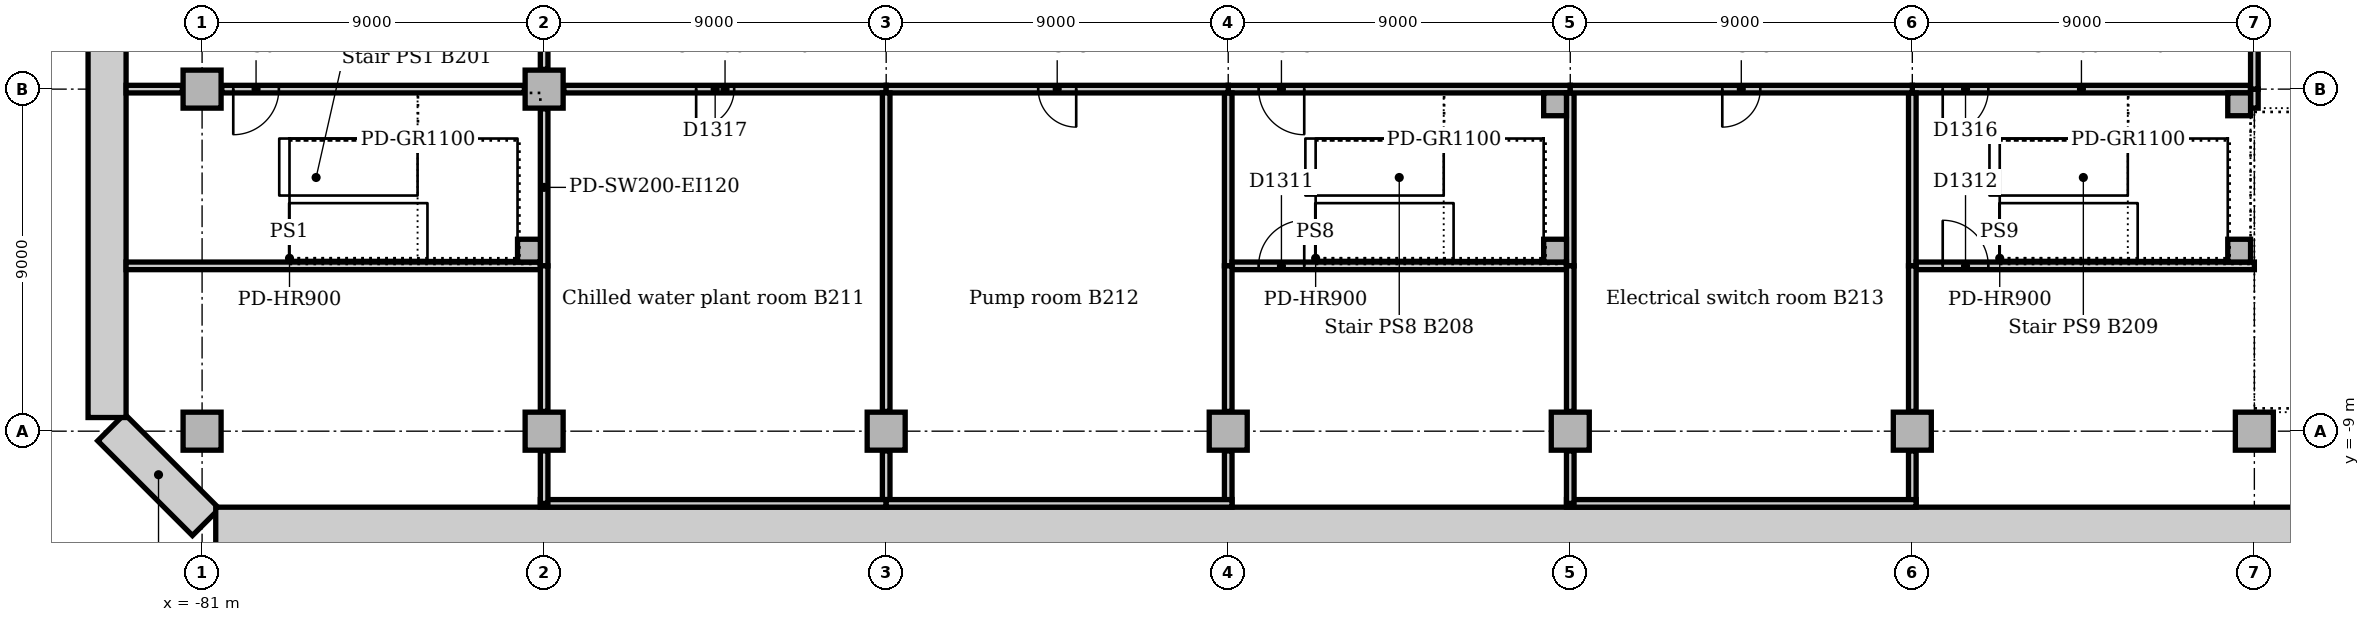
"""IFC4 building model, lengths in metres.
Left out: names, types, materials, properties, quantities, classifications, styles, units other than length and angle.
Written with IfcOpenShell. Run it as: python <this file> out.ifc"""

import sys

from ifc_helpers import new_model, si_unit, direction, frame, frame_2d, origin, origin_2d, place, context, subcontext, project, spatial, rectangle, extrude, element, fill, save


model = new_model("IFC4")
c1 = context("Model", 3, precision=1e-05, world=origin(), true_north=direction((0.0, 1.0)))
c2 = subcontext(c1, "Body", "Model", "MODEL_VIEW")
j1 = project(units=[si_unit("LENGTHUNIT", "METRE"), si_unit("PLANEANGLEUNIT", "RADIAN")], contexts=[c1])
p1 = place(None, origin())
s1 = spatial("IfcSite", under=j1, at=p1, CompositionType="ELEMENT")
p2 = place(p1, origin())
s2 = spatial("IfcBuilding", under=s1, at=p2, CompositionType="ELEMENT")
p3 = place(p2, frame((0.0, 0.0, -9.5)))
s3 = spatial("IfcBuildingStorey", under=s2, at=p3, CompositionType="ELEMENT", Elevation=-9.5)
p4 = place(p3, frame((-80.9, -11.392, 0.0), z_axis=(0.0, 0.0, 1.0), x_axis=(-0.707106781187, 0.707106781187, 0.0)))
e1 = element("IfcWall", 1, at=p4, inside=s3, PredefinedType="SOLIDWALL", context=c2, shape_type="SweptSolid", body=[
    extrude(rectangle(XDim=3.524, YDim=1.0, at=frame_2d((1.762, 0.0))), origin(), (0.0, 0.0, 1.0), 4.5),
])
p5 = place(p3, frame((-83.5, -8.641, 0.0), z_axis=(0.0, 0.0, 1.0), x_axis=(0.0, 1.0, 0.0)))
e2 = element("IfcWall", 2, at=p5, inside=s3, PredefinedType="SOLIDWALL", context=c2, shape_type="SweptSolid", body=[
    extrude(rectangle(XDim=62.282, YDim=1.0, at=frame_2d((31.141, 0.0))), origin(), (0.0, 0.0, 1.0), 4.5),
])
p6 = place(p3, frame((62.641, -11.5, 0.0), z_axis=(0.0, 0.0, 1.0), x_axis=(-1.0, 0.0, 0.0)))
e3 = element("IfcWall", 3, at=p6, inside=s3, PredefinedType="SOLIDWALL", context=c2, shape_type="SweptSolid", body=[
    extrude(rectangle(XDim=143.282, YDim=1.0, at=frame_2d((71.641, 0.0))), origin(), (0.0, 0.0, 1.0), 4.5),
])
for number, where, z_axis, x_axis in (
    (4, (-81.0, -9.0, 0.0), (0.0, 0.0, 1.0), (1.0, 0.0, 0.0)),
    (5, (-81.0, 0.0, 0.0), (0.0, 0.0, 1.0), (1.0, 0.0, 0.0)),
    (6, (-72.0, -9.0, 0.0), (0.0, 0.0, 1.0), (1.0, 0.0, 0.0)),
    (7, (-72.0, 0.0, 0.0), (0.0, 0.0, 1.0), (1.0, 0.0, 0.0)),
    (8, (-63.0, -9.0, 0.0), (0.0, 0.0, 1.0), (1.0, 0.0, 0.0)),
    (9, (-54.0, -9.0, 0.0), (0.0, 0.0, 1.0), (1.0, 0.0, 0.0)),
    (10, (-45.0, -9.0, 0.0), (0.0, 0.0, 1.0), (1.0, 0.0, 0.0)),
    (11, (-36.0, -9.0, 0.0), (0.0, 0.0, 1.0), (1.0, 0.0, 0.0)),
    (12, (-27.0, -9.0, 0.0), (0.0, 0.0, 1.0), (1.0, 0.0, 0.0)),
):
    element("IfcColumn", number, at=place(p3, frame(where, z_axis=z_axis, x_axis=x_axis)), inside=s3, PredefinedType="COLUMN", context=c2, shape_type="SweptSolid", body=[
        extrude(rectangle(XDim=1.0, YDim=1.0, at=origin_2d()), origin(), (0.0, 0.0, 1.0), 4.15),
    ])
for number, where, z_axis, x_axis in (
    (13, (-72.4, -4.25, 0.0), (0.0, 0.0, 1.0), (1.0, 0.0, 0.0)),
    (14, (-45.4, -4.25, 0.0), (0.0, 0.0, 1.0), (1.0, 0.0, 0.0)),
    (15, (-45.4, -0.4, 0.0), (0.0, 0.0, 1.0), (1.0, 0.0, 0.0)),
    (16, (-27.4, -4.25, 0.0), (0.0, 0.0, 1.0), (1.0, 0.0, 0.0)),
    (17, (-27.4, -0.4, 0.0), (0.0, 0.0, 1.0), (1.0, 0.0, 0.0)),
):
    element("IfcColumn", number, at=place(p3, frame(where, z_axis=z_axis, x_axis=x_axis)), inside=s3, PredefinedType="COLUMN", context=c2, shape_type="SweptSolid", body=[
        extrude(rectangle(XDim=0.6, YDim=0.6, at=origin_2d()), origin(), (0.0, 0.0, 1.0), 4.5),
    ])
p7 = place(p3, frame((-72.0, -4.65, 0.0), z_axis=(0.0, 0.0, 1.0), x_axis=(0.0, 1.0, 0.0)))
e18 = element("IfcWall", 18, at=p7, inside=s3, PredefinedType="SOLIDWALL", context=c2, shape_type="SweptSolid", body=[
    extrude(rectangle(XDim=4.13, YDim=0.2, at=frame_2d((2.065, 0.0))), origin(), (0.0, 0.0, 1.0), 4.15),
])
p8 = place(p3, frame((-83.0, -4.65, 0.0), z_axis=(0.0, 0.0, 1.0), x_axis=(1.0, 0.0, 0.0)))
e19 = element("IfcWall", 19, at=p8, inside=s3, PredefinedType="SOLIDWALL", context=c2, shape_type="SweptSolid", body=[
    extrude(rectangle(XDim=10.9, YDim=0.2, at=frame_2d((5.45, 0.0))), origin(), (0.0, 0.0, 1.0), 4.15),
])
p9 = place(p3, frame((-83.0, 0.0, 0.0), z_axis=(0.0, 0.0, 1.0), x_axis=(1.0, 0.0, 0.0)))
e20 = element("IfcWall", 20, at=p9, inside=s3, PredefinedType="SOLIDWALL", context=c2, shape_type="SweptSolid", body=[
    extrude(rectangle(XDim=1.48, YDim=0.2, at=frame_2d((0.74, 0.0))), origin(), (0.0, 0.0, 1.0), 4.15),
])
p10 = place(p3, frame((-80.48, 0.0, 0.0), z_axis=(0.0, 0.0, 1.0), x_axis=(1.0, 0.0, 0.0)))
e21 = element("IfcWall", 21, at=p10, inside=s3, PredefinedType="SOLIDWALL", context=c2, shape_type="SweptSolid", body=[
    extrude(rectangle(XDim=7.96, YDim=0.2, at=frame_2d((3.98, 0.0))), origin(), (0.0, 0.0, 1.0), 4.15),
])
p11 = place(p10, frame((0.3, 0.0, 0.0)))
e22 = element("IfcOpeningElement", 22, at=p11, cuts=e21, PredefinedType="OPENING", context=c2, shape_type="SweptSolid", body=[
    extrude(rectangle(XDim=1.2, YDim=2.1, at=frame_2d((0.6, 1.05))), frame((0.0, 0.11, 0.0), z_axis=(0.0, -1.0, 0.0), x_axis=(1.0, 0.0, 0.0)), (0.0, 0.0, 1.0), 0.22),
])
p12 = place(p3, frame((-54.0, 0.0, 0.0), z_axis=(0.0, 0.0, 1.0), x_axis=(1.0, 0.0, 0.0)))
e23 = element("IfcWall", 23, at=p12, inside=s3, PredefinedType="SOLIDWALL", context=c2, shape_type="SweptSolid", body=[
    extrude(rectangle(XDim=9.0, YDim=0.2, at=frame_2d((4.5, 0.0))), origin(), (0.0, 0.0, 1.0), 4.15),
])
p13 = place(p12, frame((0.8, 0.0, 0.0)))
e24 = element("IfcOpeningElement", 24, at=p13, cuts=e23, PredefinedType="OPENING", context=c2, shape_type="SweptSolid", body=[
    extrude(rectangle(XDim=1.2, YDim=2.1, at=frame_2d((0.6, 1.05))), frame((0.0, 0.11, 0.0), z_axis=(0.0, -1.0, 0.0), x_axis=(1.0, 0.0, 0.0)), (0.0, 0.0, 1.0), 0.22),
])
for number, where, z_axis, x_axis in (
    (25, (-54.0, -4.65, 0.0), (0.0, 0.0, 1.0), (0.0, 1.0, 0.0)),
    (26, (-45.0, -4.65, 0.0), (0.0, 0.0, 1.0), (0.0, 1.0, 0.0)),
):
    element("IfcWall", number, at=place(p3, frame(where, z_axis=z_axis, x_axis=x_axis)), inside=s3, PredefinedType="SOLIDWALL", context=c2, shape_type="SweptSolid", body=[
        extrude(rectangle(XDim=4.55, YDim=0.2, at=frame_2d((2.275, 0.0))), origin(), (0.0, 0.0, 1.0), 4.15),
    ])
p14 = place(p3, frame((-53.9, -4.65, 0.0), z_axis=(0.0, 0.0, 1.0), x_axis=(1.0, 0.0, 0.0)))
e27 = element("IfcWall", 27, at=p14, inside=s3, PredefinedType="SOLIDWALL", context=c2, shape_type="SweptSolid", body=[
    extrude(rectangle(XDim=8.8, YDim=0.2, at=frame_2d((4.4, 0.0))), origin(), (0.0, 0.0, 1.0), 4.15),
])
p15 = place(p14, frame((0.7, 0.0, 0.0)))
e28 = element("IfcOpeningElement", 28, at=p15, cuts=e27, PredefinedType="OPENING", context=c2, shape_type="SweptSolid", body=[
    extrude(rectangle(XDim=1.2, YDim=2.1, at=frame_2d((0.6, 1.05))), frame((0.0, 0.11, 0.0), z_axis=(0.0, -1.0, 0.0), x_axis=(1.0, 0.0, 0.0)), (0.0, 0.0, 1.0), 0.22),
])
p16 = place(p3, frame((-36.0, 0.0, 0.0), z_axis=(0.0, 0.0, 1.0), x_axis=(1.0, 0.0, 0.0)))
e29 = element("IfcWall", 29, at=p16, inside=s3, PredefinedType="SOLIDWALL", context=c2, shape_type="SweptSolid", body=[
    extrude(rectangle(XDim=8.9, YDim=0.2, at=frame_2d((4.45, 0.0))), origin(), (0.0, 0.0, 1.0), 4.15),
])
p17 = place(p16, frame((0.8, 0.0, 0.0)))
e30 = element("IfcOpeningElement", 30, at=p17, cuts=e29, PredefinedType="OPENING", context=c2, shape_type="SweptSolid", body=[
    extrude(rectangle(XDim=1.2, YDim=2.1, at=frame_2d((0.6, 1.05))), frame((0.0, 0.11, 0.0), z_axis=(0.0, -1.0, 0.0), x_axis=(1.0, 0.0, 0.0)), (0.0, 0.0, 1.0), 0.22),
])
p18 = place(p3, frame((-36.0, -4.65, 0.0), z_axis=(0.0, 0.0, 1.0), x_axis=(0.0, 1.0, 0.0)))
e31 = element("IfcWall", 31, at=p18, inside=s3, PredefinedType="SOLIDWALL", context=c2, shape_type="SweptSolid", body=[
    extrude(rectangle(XDim=4.55, YDim=0.2, at=frame_2d((2.275, 0.0))), origin(), (0.0, 0.0, 1.0), 4.15),
])
p19 = place(p3, frame((-27.0, -0.5, 0.0), z_axis=(0.0, 0.0, 1.0), x_axis=(0.0, 1.0, 0.0)))
e32 = element("IfcWall", 32, at=p19, inside=s3, PredefinedType="SOLIDWALL", context=c2, shape_type="SweptSolid", body=[
    extrude(rectangle(XDim=0.5, YDim=0.2, at=frame_2d((0.25, 0.0))), origin(), (0.0, 0.0, 1.0), 4.15),
])
p20 = place(p3, frame((-35.9, -4.65, 0.0), z_axis=(0.0, 0.0, 1.0), x_axis=(1.0, 0.0, 0.0)))
e33 = element("IfcWall", 33, at=p20, inside=s3, PredefinedType="SOLIDWALL", context=c2, shape_type="SweptSolid", body=[
    extrude(rectangle(XDim=8.9, YDim=0.2, at=frame_2d((4.45, 0.0))), origin(), (0.0, 0.0, 1.0), 4.15),
])
p21 = place(p20, frame((0.7, 0.0, 0.0)))
e34 = element("IfcOpeningElement", 34, at=p21, cuts=e33, PredefinedType="OPENING", context=c2, shape_type="SweptSolid", body=[
    extrude(rectangle(XDim=1.2, YDim=2.1, at=frame_2d((0.6, 1.05))), frame((0.0, 0.11, 0.0), z_axis=(0.0, -1.0, 0.0), x_axis=(1.0, 0.0, 0.0)), (0.0, 0.0, 1.0), 0.22),
])
p22 = place(p3, frame((-71.48, 0.0, 0.0), z_axis=(0.0, 0.0, 1.0), x_axis=(1.0, 0.0, 0.0)))
e35 = element("IfcWall", 35, at=p22, inside=s3, PredefinedType="PARTITIONING", context=c2, shape_type="SweptSolid", body=[
    extrude(rectangle(XDim=8.48, YDim=0.2, at=frame_2d((4.24, 0.0))), origin(), (0.0, 0.0, 1.0), 4.15),
])
p23 = place(p22, frame((3.48, 0.0, 0.0)))
e36 = element("IfcOpeningElement", 36, at=p23, cuts=e35, PredefinedType="OPENING", context=c2, shape_type="SweptSolid", body=[
    extrude(rectangle(XDim=1.0, YDim=2.1, at=frame_2d((0.5, 1.05))), frame((0.0, 0.11, 0.0), z_axis=(0.0, -1.0, 0.0), x_axis=(1.0, 0.0, 0.0)), (0.0, 0.0, 1.0), 0.22),
])
p24 = place(p3, frame((-63.0, 0.0, 0.0), z_axis=(0.0, 0.0, 1.0), x_axis=(1.0, 0.0, 0.0)))
e37 = element("IfcWall", 37, at=p24, inside=s3, PredefinedType="PARTITIONING", context=c2, shape_type="SweptSolid", body=[
    extrude(rectangle(XDim=9.0, YDim=0.2, at=frame_2d((4.5, 0.0))), origin(), (0.0, 0.0, 1.0), 4.15),
])
p25 = place(p24, frame((4.0, 0.0, 0.0)))
e38 = element("IfcOpeningElement", 38, at=p25, cuts=e37, PredefinedType="OPENING", context=c2, shape_type="SweptSolid", body=[
    extrude(rectangle(XDim=1.0, YDim=2.1, at=frame_2d((0.5, 1.05))), frame((0.0, 0.11, 0.0), z_axis=(0.0, -1.0, 0.0), x_axis=(1.0, 0.0, 0.0)), (0.0, 0.0, 1.0), 0.22),
])
p26 = place(p3, frame((-45.0, 0.0, 0.0), z_axis=(0.0, 0.0, 1.0), x_axis=(1.0, 0.0, 0.0)))
e39 = element("IfcWall", 39, at=p26, inside=s3, PredefinedType="PARTITIONING", context=c2, shape_type="SweptSolid", body=[
    extrude(rectangle(XDim=9.0, YDim=0.2, at=frame_2d((4.5, 0.0))), origin(), (0.0, 0.0, 1.0), 4.15),
])
p27 = place(p26, frame((4.0, 0.0, 0.0)))
e40 = element("IfcOpeningElement", 40, at=p27, cuts=e39, PredefinedType="OPENING", context=c2, shape_type="SweptSolid", body=[
    extrude(rectangle(XDim=1.0, YDim=2.1, at=frame_2d((0.5, 1.05))), frame((0.0, 0.11, 0.0), z_axis=(0.0, -1.0, 0.0), x_axis=(1.0, 0.0, 0.0)), (0.0, 0.0, 1.0), 0.22),
])
p28 = place(p3, frame((-27.0, 0.0, 0.0), z_axis=(0.0, 0.0, 1.0), x_axis=(0.0, 1.0, 0.0)))
e41 = element("IfcWall", 41, at=p28, inside=s3, PredefinedType="PARTITIONING", context=c2, shape_type="SweptSolid", body=[
    extrude(rectangle(XDim=3.5, YDim=0.2, at=frame_2d((1.75, 0.0))), origin(), (0.0, 0.0, 1.0), 4.15),
])
p29 = place(p3, frame((-72.0, 0.52, 0.0), z_axis=(0.0, 0.0, 1.0), x_axis=(0.0, 1.0, 0.0)))
e42 = element("IfcWall", 42, at=p29, inside=s3, PredefinedType="PARTITIONING", context=c2, shape_type="SweptSolid", body=[
    extrude(rectangle(XDim=3.08, YDim=0.2, at=frame_2d((1.54, 0.0))), origin(), (0.0, 0.0, 1.0), 4.15),
])
p30 = place(p3, frame((-63.0, -10.9, 0.0), z_axis=(0.0, 0.0, 1.0), x_axis=(0.0, 1.0, 0.0)))
e43 = element("IfcWall", 43, at=p30, inside=s3, PredefinedType="PARTITIONING", context=c2, shape_type="SweptSolid", body=[
    extrude(rectangle(XDim=1.38, YDim=0.2, at=frame_2d((0.69, 0.0))), origin(), (0.0, 0.0, 1.0), 4.15),
])
p31 = place(p3, frame((-63.0, -8.48, 0.0), z_axis=(0.0, 0.0, 1.0), x_axis=(0.0, 1.0, 0.0)))
e44 = element("IfcWall", 44, at=p31, inside=s3, PredefinedType="PARTITIONING", context=c2, shape_type="SweptSolid", body=[
    extrude(rectangle(XDim=8.38, YDim=0.2, at=frame_2d((4.19, 0.0))), origin(), (0.0, 0.0, 1.0), 4.15),
])
p32 = place(p3, frame((-72.1, -10.9, 0.0), z_axis=(0.0, 0.0, 1.0), x_axis=(1.0, 0.0, 0.0)))
e45 = element("IfcWall", 45, at=p32, inside=s3, PredefinedType="PARTITIONING", context=c2, shape_type="SweptSolid", body=[
    extrude(rectangle(XDim=9.1, YDim=0.2, at=frame_2d((4.55, 0.0))), origin(), (0.0, 0.0, 1.0), 4.15),
])
p33 = place(p3, frame((-72.0, -10.9, 0.0), z_axis=(0.0, 0.0, 1.0), x_axis=(0.0, 1.0, 0.0)))
e46 = element("IfcWall", 46, at=p33, inside=s3, PredefinedType="PARTITIONING", context=c2, shape_type="SweptSolid", body=[
    extrude(rectangle(XDim=1.38, YDim=0.2, at=frame_2d((0.69, 0.0))), origin(), (0.0, 0.0, 1.0), 4.15),
])
p34 = place(p3, frame((-72.0, -8.48, 0.0), z_axis=(0.0, 0.0, 1.0), x_axis=(0.0, 1.0, 0.0)))
e47 = element("IfcWall", 47, at=p34, inside=s3, PredefinedType="PARTITIONING", context=c2, shape_type="SweptSolid", body=[
    extrude(rectangle(XDim=3.83, YDim=0.2, at=frame_2d((1.915, 0.0))), origin(), (0.0, 0.0, 1.0), 4.15),
])
p35 = place(p3, frame((-54.0, -10.9, 0.0), z_axis=(0.0, 0.0, 1.0), x_axis=(0.0, 1.0, 0.0)))
e48 = element("IfcWall", 48, at=p35, inside=s3, PredefinedType="PARTITIONING", context=c2, shape_type="SweptSolid", body=[
    extrude(rectangle(XDim=1.38, YDim=0.2, at=frame_2d((0.69, 0.0))), origin(), (0.0, 0.0, 1.0), 4.15),
])
p36 = place(p3, frame((-54.0, -8.48, 0.0), z_axis=(0.0, 0.0, 1.0), x_axis=(0.0, 1.0, 0.0)))
e49 = element("IfcWall", 49, at=p36, inside=s3, PredefinedType="PARTITIONING", context=c2, shape_type="SweptSolid", body=[
    extrude(rectangle(XDim=3.83, YDim=0.2, at=frame_2d((1.915, 0.0))), origin(), (0.0, 0.0, 1.0), 4.15),
])
p37 = place(p3, frame((-63.0, -10.9, 0.0), z_axis=(0.0, 0.0, 1.0), x_axis=(1.0, 0.0, 0.0)))
e50 = element("IfcWall", 50, at=p37, inside=s3, PredefinedType="PARTITIONING", context=c2, shape_type="SweptSolid", body=[
    extrude(rectangle(XDim=9.1, YDim=0.2, at=frame_2d((4.55, 0.0))), origin(), (0.0, 0.0, 1.0), 4.15),
])
p38 = place(p3, frame((-36.0, -10.9, 0.0), z_axis=(0.0, 0.0, 1.0), x_axis=(0.0, 1.0, 0.0)))
e51 = element("IfcWall", 51, at=p38, inside=s3, PredefinedType="PARTITIONING", context=c2, shape_type="SweptSolid", body=[
    extrude(rectangle(XDim=1.38, YDim=0.2, at=frame_2d((0.69, 0.0))), origin(), (0.0, 0.0, 1.0), 4.15),
])
p39 = place(p3, frame((-36.0, -8.48, 0.0), z_axis=(0.0, 0.0, 1.0), x_axis=(0.0, 1.0, 0.0)))
e52 = element("IfcWall", 52, at=p39, inside=s3, PredefinedType="PARTITIONING", context=c2, shape_type="SweptSolid", body=[
    extrude(rectangle(XDim=3.83, YDim=0.2, at=frame_2d((1.915, 0.0))), origin(), (0.0, 0.0, 1.0), 4.15),
])
p40 = place(p3, frame((-45.1, -10.9, 0.0), z_axis=(0.0, 0.0, 1.0), x_axis=(1.0, 0.0, 0.0)))
e53 = element("IfcWall", 53, at=p40, inside=s3, PredefinedType="PARTITIONING", context=c2, shape_type="SweptSolid", body=[
    extrude(rectangle(XDim=9.2, YDim=0.2, at=frame_2d((4.6, 0.0))), origin(), (0.0, 0.0, 1.0), 4.15),
])
p41 = place(p3, frame((-45.0, -10.9, 0.0), z_axis=(0.0, 0.0, 1.0), x_axis=(0.0, 1.0, 0.0)))
e54 = element("IfcWall", 54, at=p41, inside=s3, PredefinedType="PARTITIONING", context=c2, shape_type="SweptSolid", body=[
    extrude(rectangle(XDim=1.38, YDim=0.2, at=frame_2d((0.69, 0.0))), origin(), (0.0, 0.0, 1.0), 4.15),
])
p42 = place(p3, frame((-45.0, -8.48, 0.0), z_axis=(0.0, 0.0, 1.0), x_axis=(0.0, 1.0, 0.0)))
e55 = element("IfcWall", 55, at=p42, inside=s3, PredefinedType="PARTITIONING", context=c2, shape_type="SweptSolid", body=[
    extrude(rectangle(XDim=3.83, YDim=0.2, at=frame_2d((1.915, 0.0))), origin(), (0.0, 0.0, 1.0), 4.15),
])
p43 = place(p11, frame((1.2, 0.0, 0.0), z_axis=(0.0, 0.0, 1.0), x_axis=(-1.0, 0.0, 0.0)))
e56 = element("IfcDoor", 56, at=p43, inside=s3, OperationType="SINGLE_SWING_RIGHT", PredefinedType="DOOR", context=c2, shape_type="SweptSolid", body=[
    extrude(rectangle(XDim=1.2, YDim=2.1, at=frame_2d((0.6, 1.05))), frame((0.0, 0.025, 0.0), z_axis=(0.0, -1.0, 0.0), x_axis=(1.0, 0.0, 0.0)), (0.0, 0.0, 1.0), 0.05),
])
fill(e22, e56)
p44 = place(p15, origin())
e57 = element("IfcDoor", 57, at=p44, inside=s3, OperationType="SINGLE_SWING_RIGHT", PredefinedType="DOOR", context=c2, shape_type="SweptSolid", body=[
    extrude(rectangle(XDim=1.2, YDim=2.1, at=frame_2d((0.6, 1.05))), frame((0.0, 0.025, 0.0), z_axis=(0.0, -1.0, 0.0), x_axis=(1.0, 0.0, 0.0)), (0.0, 0.0, 1.0), 0.05),
])
fill(e28, e57)
p45 = place(p21, origin())
e58 = element("IfcDoor", 58, at=p45, inside=s3, OperationType="SINGLE_SWING_LEFT", PredefinedType="DOOR", context=c2, shape_type="SweptSolid", body=[
    extrude(rectangle(XDim=1.2, YDim=2.1, at=frame_2d((0.6, 1.05))), frame((0.0, 0.025, 0.0), z_axis=(0.0, -1.0, 0.0), x_axis=(1.0, 0.0, 0.0)), (0.0, 0.0, 1.0), 0.05),
])
fill(e34, e58)
p46 = place(p13, frame((1.2, 0.0, 0.0), z_axis=(0.0, 0.0, 1.0), x_axis=(-1.0, 0.0, 0.0)))
e59 = element("IfcDoor", 59, at=p46, inside=s3, OperationType="SINGLE_SWING_LEFT", PredefinedType="DOOR", context=c2, shape_type="SweptSolid", body=[
    extrude(rectangle(XDim=1.2, YDim=2.1, at=frame_2d((0.6, 1.05))), frame((0.0, 0.025, 0.0), z_axis=(0.0, -1.0, 0.0), x_axis=(1.0, 0.0, 0.0)), (0.0, 0.0, 1.0), 0.05),
])
fill(e24, e59)
p47 = place(p17, frame((1.2, 0.0, 0.0), z_axis=(0.0, 0.0, 1.0), x_axis=(-1.0, 0.0, 0.0)))
e60 = element("IfcDoor", 60, at=p47, inside=s3, OperationType="SINGLE_SWING_RIGHT", PredefinedType="DOOR", context=c2, shape_type="SweptSolid", body=[
    extrude(rectangle(XDim=1.2, YDim=2.1, at=frame_2d((0.6, 1.05))), frame((0.0, 0.025, 0.0), z_axis=(0.0, -1.0, 0.0), x_axis=(1.0, 0.0, 0.0)), (0.0, 0.0, 1.0), 0.05),
])
fill(e30, e60)
p48 = place(p23, frame((1.0, 0.0, 0.0), z_axis=(0.0, 0.0, 1.0), x_axis=(-1.0, 0.0, 0.0)))
e61 = element("IfcDoor", 61, at=p48, inside=s3, OperationType="SINGLE_SWING_RIGHT", PredefinedType="DOOR", context=c2, shape_type="SweptSolid", body=[
    extrude(rectangle(XDim=1.0, YDim=2.1, at=frame_2d((0.5, 1.05))), frame((0.0, 0.025, 0.0), z_axis=(0.0, -1.0, 0.0), x_axis=(1.0, 0.0, 0.0)), (0.0, 0.0, 1.0), 0.05),
])
fill(e36, e61)
p49 = place(p25, frame((1.0, 0.0, 0.0), z_axis=(0.0, 0.0, 1.0), x_axis=(-1.0, 0.0, 0.0)))
e62 = element("IfcDoor", 62, at=p49, inside=s3, OperationType="SINGLE_SWING_LEFT", PredefinedType="DOOR", context=c2, shape_type="SweptSolid", body=[
    extrude(rectangle(XDim=1.0, YDim=2.1, at=frame_2d((0.5, 1.05))), frame((0.0, 0.025, 0.0), z_axis=(0.0, -1.0, 0.0), x_axis=(1.0, 0.0, 0.0)), (0.0, 0.0, 1.0), 0.05),
])
fill(e38, e62)
p50 = place(p27, frame((1.0, 0.0, 0.0), z_axis=(0.0, 0.0, 1.0), x_axis=(-1.0, 0.0, 0.0)))
e63 = element("IfcDoor", 63, at=p50, inside=s3, OperationType="SINGLE_SWING_RIGHT", PredefinedType="DOOR", context=c2, shape_type="SweptSolid", body=[
    extrude(rectangle(XDim=1.0, YDim=2.1, at=frame_2d((0.5, 1.05))), frame((0.0, 0.025, 0.0), z_axis=(0.0, -1.0, 0.0), x_axis=(1.0, 0.0, 0.0)), (0.0, 0.0, 1.0), 0.05),
])
fill(e40, e63)
save(model, sys.argv[1])
